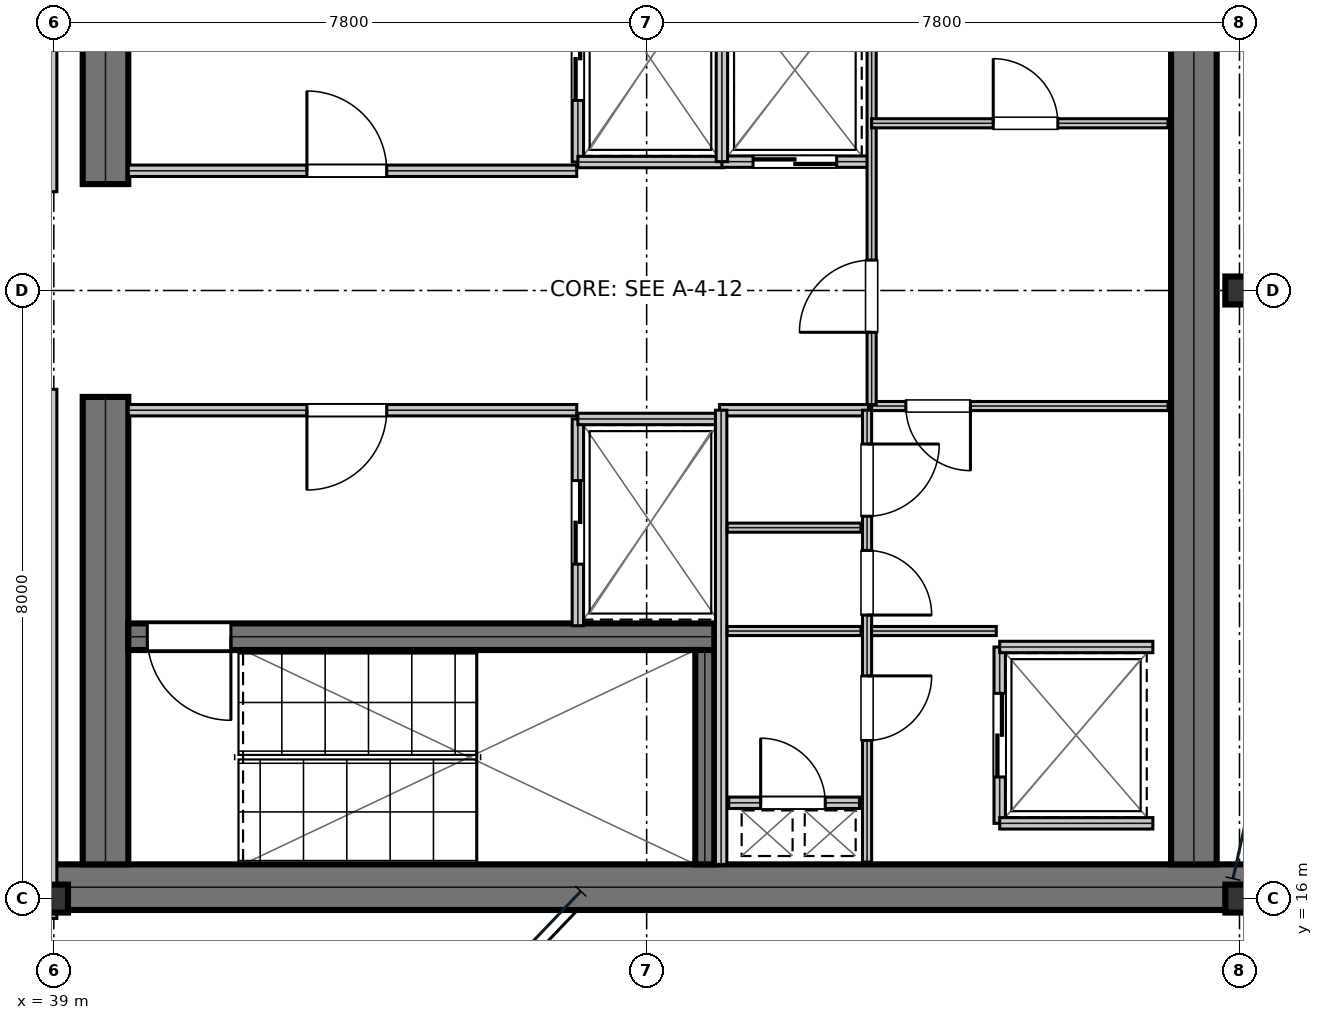
"""IFC4 building model, lengths in metres.
Left out: names, types, materials, properties, quantities, classifications, styles, units other than length and angle.
Written with IfcOpenShell. Run it as: python <this file> out.ifc"""

import sys

from ifc_helpers import new_model, si_unit, direction, frame, frame_2d, origin, origin_2d, place, context, subcontext, project, spatial, rectangle, i_section, extrude, element, fill, save


model = new_model("IFC4")
c1 = context("Model", 3, precision=1e-05, world=origin(), true_north=direction((0.0, 1.0)))
c2 = subcontext(c1, "Body", "Model", "MODEL_VIEW")
j1 = project(units=[si_unit("LENGTHUNIT", "METRE"), si_unit("PLANEANGLEUNIT", "RADIAN")], contexts=[c1])
p1 = place(None, origin())
s1 = spatial("IfcSite", under=j1, at=p1, CompositionType="ELEMENT")
p2 = place(p1, origin())
s2 = spatial("IfcBuilding", under=s1, at=p2, CompositionType="ELEMENT")
p3 = place(p2, frame((0.0, 0.0, 295.2)))
s3 = spatial("IfcBuildingStorey", under=s2, at=p3, CompositionType="ELEMENT", Elevation=295.2)
p4 = place(p3, frame((38.8, 16.15, 0.0), z_axis=(0.0, 0.0, 1.0), x_axis=(1.0, 0.0, 0.0)))
e1 = element("IfcWall", 1, at=p4, inside=s3, PredefinedType="SHEAR", context=c2, shape_type="SweptSolid", body=[
    extrude(rectangle(XDim=16.0, YDim=0.6, at=frame_2d((8.0, 0.0))), origin(), (0.0, 0.0, 1.0), 3.81),
])
for number, where, z_axis, x_axis in (
    (2, (39.68, 16.45, 0.0), (0.0, 0.0, 1.0), (0.0, 1.0, 0.0)),
    (3, (39.68, 25.4, 0.0), (0.0, 0.0, 1.0), (0.0, 1.0, 0.0)),
):
    element("IfcWall", number, at=place(p3, frame(where, z_axis=z_axis, x_axis=x_axis)), inside=s3, PredefinedType="SHEAR", context=c2, shape_type="SweptSolid", body=[
        extrude(rectangle(XDim=6.15, YDim=0.6, at=frame_2d((3.075, 0.0))), origin(), (0.0, 0.0, 1.0), 3.81),
    ])
p5 = place(p3, frame((54.0, 16.45, 0.0), z_axis=(0.0, 0.0, 1.0), x_axis=(0.0, 1.0, 0.0)))
e4 = element("IfcWall", 4, at=p5, inside=s3, PredefinedType="SHEAR", context=c2, shape_type="SweptSolid", body=[
    extrude(rectangle(XDim=15.1, YDim=0.6, at=frame_2d((7.55, 0.0))), origin(), (0.0, 0.0, 1.0), 3.81),
])
p6 = place(p3, frame((39.98, 19.445, 0.0), z_axis=(0.0, 0.0, 1.0), x_axis=(1.0, 0.0, 0.0)))
e5 = element("IfcWall", 5, at=p6, inside=s3, PredefinedType="SHEAR", context=c2, shape_type="SweptSolid", body=[
    extrude(rectangle(XDim=7.71, YDim=0.35, at=frame_2d((3.855, 0.0))), origin(), (0.0, 0.0, 1.0), 3.81),
])
p7 = place(p6, frame((0.25, 0.0, 0.0)))
e6 = element("IfcOpeningElement", 6, at=p7, cuts=e5, PredefinedType="OPENING", context=c2, shape_type="SweptSolid", body=[
    extrude(rectangle(XDim=1.1, YDim=2.15, at=frame_2d((0.55, 1.075))), frame((0.0, 0.185, 0.0), z_axis=(0.0, -1.0, 0.0), x_axis=(1.0, 0.0, 0.0)), (0.0, 0.0, 1.0), 0.37),
])
p8 = place(p3, frame((47.565, 16.45, 0.0), z_axis=(0.0, 0.0, 1.0), x_axis=(0.0, 1.0, 0.0)))
e7 = element("IfcWall", 7, at=p8, inside=s3, PredefinedType="SHEAR", context=c2, shape_type="SweptSolid", body=[
    extrude(rectangle(XDim=2.82, YDim=0.25, at=frame_2d((1.41, 0.0))), origin(), (0.0, 0.0, 1.0), 3.81),
])
for number, where, z_axis, x_axis in (
    (8, (39.0, 16.0, 0.0), (0.0, 0.0, 1.0), (1.0, 0.0, 0.0)),
    (9, (54.6, 16.0, 0.0), (0.0, 0.0, 1.0), (1.0, 0.0, 0.0)),
    (10, (54.6, 24.0, 0.0), (0.0, 0.0, 1.0), (1.0, 0.0, 0.0)),
):
    element("IfcColumn", number, at=place(p3, frame(where, z_axis=z_axis, x_axis=x_axis)), inside=s3, PredefinedType="COLUMN", context=c2, shape_type="SweptSolid", body=[
        extrude(i_section(OverallWidth=0.373, OverallDepth=0.368, WebThickness=0.015, FlangeThickness=0.024, at=origin_2d()), origin(), (0.0, 0.0, 1.0), 4.044),
    ])
p9 = place(p3, frame((39.98, 25.575, 0.0), z_axis=(0.0, 0.0, 1.0), x_axis=(1.0, 0.0, 0.0)))
e11 = element("IfcWall", 11, at=p9, inside=s3, PredefinedType="PARTITIONING", context=c2, shape_type="SweptSolid", body=[
    extrude(rectangle(XDim=5.9, YDim=0.15, at=frame_2d((2.95, 0.0))), origin(), (0.0, 0.0, 1.0), 3.81),
])
p10 = place(p9, frame((2.35, 0.0, 0.0)))
e12 = element("IfcOpeningElement", 12, at=p10, cuts=e11, PredefinedType="OPENING", context=c2, shape_type="SweptSolid", body=[
    extrude(rectangle(XDim=1.05, YDim=2.15, at=frame_2d((0.525, 1.075))), frame((0.0, 0.085, 0.0), z_axis=(0.0, -1.0, 0.0), x_axis=(1.0, 0.0, 0.0)), (0.0, 0.0, 1.0), 0.17),
])
p11 = place(p3, frame((39.98, 22.425, 0.0), z_axis=(0.0, 0.0, 1.0), x_axis=(1.0, 0.0, 0.0)))
e13 = element("IfcWall", 13, at=p11, inside=s3, PredefinedType="PARTITIONING", context=c2, shape_type="SweptSolid", body=[
    extrude(rectangle(XDim=5.9, YDim=0.15, at=frame_2d((2.95, 0.0))), origin(), (0.0, 0.0, 1.0), 3.81),
])
p12 = place(p11, frame((2.35, 0.0, 0.0)))
e14 = element("IfcOpeningElement", 14, at=p12, cuts=e13, PredefinedType="OPENING", context=c2, shape_type="SweptSolid", body=[
    extrude(rectangle(XDim=1.05, YDim=2.15, at=frame_2d((0.525, 1.075))), frame((0.0, 0.085, 0.0), z_axis=(0.0, -1.0, 0.0), x_axis=(1.0, 0.0, 0.0)), (0.0, 0.0, 1.0), 0.17),
])
p13 = place(p3, frame((45.895, 25.69, 0.0), z_axis=(0.0, 0.0, 1.0), x_axis=(0.0, 1.0, 0.0)))
e15 = element("IfcWall", 15, at=p13, inside=s3, PredefinedType="PARTITIONING", context=c2, shape_type="SweptSolid", body=[
    extrude(rectangle(XDim=2.72, YDim=0.15, at=frame_2d((1.36, 0.0))), origin(), (0.0, 0.0, 1.0), 3.81),
])
p14 = place(p13, frame((0.81, 0.0, 0.0)))
e16 = element("IfcOpeningElement", 16, at=p14, cuts=e15, PredefinedType="OPENING", context=c2, shape_type="SweptSolid", body=[
    extrude(rectangle(XDim=1.1, YDim=2.15, at=frame_2d((0.55, 1.075))), frame((0.0, 0.085, 0.0), z_axis=(0.0, -1.0, 0.0), x_axis=(1.0, 0.0, 0.0)), (0.0, 0.0, 1.0), 0.17),
])
p15 = place(p3, frame((45.895, 25.69, 0.0), z_axis=(0.0, 0.0, 1.0), x_axis=(1.0, 0.0, 0.0)))
e17 = element("IfcWall", 17, at=p15, inside=s3, PredefinedType="PARTITIONING", context=c2, shape_type="SweptSolid", body=[
    extrude(rectangle(XDim=1.915, YDim=0.15, at=frame_2d((0.958, 0.0))), origin(), (0.0, 0.0, 1.0), 3.81),
])
p16 = place(p3, frame((45.895, 19.59, 0.0), z_axis=(0.0, 0.0, 1.0), x_axis=(0.0, 1.0, 0.0)))
e18 = element("IfcWall", 18, at=p16, inside=s3, PredefinedType="PARTITIONING", context=c2, shape_type="SweptSolid", body=[
    extrude(rectangle(XDim=2.72, YDim=0.15, at=frame_2d((1.36, 0.0))), origin(), (0.0, 0.0, 1.0), 3.81),
])
p17 = place(p16, frame((0.81, 0.0, 0.0)))
e19 = element("IfcOpeningElement", 19, at=p17, cuts=e18, PredefinedType="OPENING", context=c2, shape_type="SweptSolid", body=[
    extrude(rectangle(XDim=1.1, YDim=2.15, at=frame_2d((0.55, 1.075))), frame((0.0, 0.085, 0.0), z_axis=(0.0, -1.0, 0.0), x_axis=(1.0, 0.0, 0.0)), (0.0, 0.0, 1.0), 0.17),
])
p18 = place(p3, frame((45.895, 22.31, 0.0), z_axis=(0.0, 0.0, 1.0), x_axis=(1.0, 0.0, 0.0)))
e20 = element("IfcWall", 20, at=p18, inside=s3, PredefinedType="PARTITIONING", context=c2, shape_type="SweptSolid", body=[
    extrude(rectangle(XDim=1.915, YDim=0.15, at=frame_2d((0.958, 0.0))), origin(), (0.0, 0.0, 1.0), 3.81),
])
p19 = place(p3, frame((47.79, 25.695, 0.0), z_axis=(0.0, 0.0, 1.0), x_axis=(1.0, 0.0, 0.0)))
e21 = element("IfcWall", 21, at=p19, inside=s3, PredefinedType="PARTITIONING", context=c2, shape_type="SweptSolid", body=[
    extrude(rectangle(XDim=1.92, YDim=0.15, at=frame_2d((0.96, 0.0))), origin(), (0.0, 0.0, 1.0), 3.81),
])
p20 = place(p19, frame((0.41, 0.0, 0.0)))
e22 = element("IfcOpeningElement", 22, at=p20, cuts=e21, PredefinedType="OPENING", context=c2, shape_type="SweptSolid", body=[
    extrude(rectangle(XDim=1.1, YDim=2.15, at=frame_2d((0.55, 1.075))), frame((0.0, 0.085, 0.0), z_axis=(0.0, -1.0, 0.0), x_axis=(1.0, 0.0, 0.0)), (0.0, 0.0, 1.0), 0.17),
])
p21 = place(p3, frame((47.79, 25.695, 0.0), z_axis=(0.0, 0.0, 1.0), x_axis=(0.0, 1.0, 0.0)))
e23 = element("IfcWall", 23, at=p21, inside=s3, PredefinedType="PARTITIONING", context=c2, shape_type="SweptSolid", body=[
    extrude(rectangle(XDim=2.415, YDim=0.15, at=frame_2d((1.208, 0.0))), origin(), (0.0, 0.0, 1.0), 3.81),
])
p22 = place(p3, frame((51.445, 16.99, 0.0), z_axis=(0.0, 0.0, 1.0), x_axis=(0.0, 1.0, 0.0)))
e24 = element("IfcWall", 24, at=p22, inside=s3, PredefinedType="PARTITIONING", context=c2, shape_type="SweptSolid", body=[
    extrude(rectangle(XDim=2.32, YDim=0.15, at=frame_2d((1.16, 0.0))), origin(), (0.0, 0.0, 1.0), 3.81),
])
p23 = place(p22, frame((0.61, 0.0, 0.0)))
e25 = element("IfcOpeningElement", 25, at=p23, cuts=e24, PredefinedType="OPENING", context=c2, shape_type="SweptSolid", body=[
    extrude(rectangle(XDim=1.1, YDim=2.15, at=frame_2d((0.55, 1.075))), frame((0.0, 0.085, 0.0), z_axis=(0.0, -1.0, 0.0), x_axis=(1.0, 0.0, 0.0)), (0.0, 0.0, 1.0), 0.17),
])
for number, where, z_axis, x_axis in (
    (26, (51.445, 16.99, 0.0), (0.0, 0.0, 1.0), (1.0, 0.0, 0.0)),
    (27, (51.445, 19.31, 0.0), (0.0, 0.0, 1.0), (1.0, 0.0, 0.0)),
):
    element("IfcWall", number, at=place(p3, frame(where, z_axis=z_axis, x_axis=x_axis)), inside=s3, PredefinedType="PARTITIONING", context=c2, shape_type="SweptSolid", body=[
        extrude(rectangle(XDim=2.015, YDim=0.15, at=frame_2d((1.007, 0.0))), origin(), (0.0, 0.0, 1.0), 3.81),
    ])
p24 = place(p3, frame((47.88, 17.26, 0.0), z_axis=(0.0, 0.0, 1.0), x_axis=(1.0, 0.0, 0.0)))
e28 = element("IfcWall", 28, at=p24, inside=s3, PredefinedType="PARTITIONING", context=c2, shape_type="SweptSolid", body=[
    extrude(rectangle(XDim=1.72, YDim=0.15, at=frame_2d((0.86, 0.0))), origin(), (0.0, 0.0, 1.0), 3.81),
])
p25 = place(p24, frame((0.42, 0.0, 0.0)))
e29 = element("IfcOpeningElement", 29, at=p25, cuts=e28, PredefinedType="OPENING", context=c2, shape_type="SweptSolid", body=[
    extrude(rectangle(XDim=0.85, YDim=2.15, at=frame_2d((0.425, 1.075))), frame((0.0, 0.085, 0.0), z_axis=(0.0, -1.0, 0.0), x_axis=(1.0, 0.0, 0.0)), (0.0, 0.0, 1.0), 0.17),
])
p26 = place(p3, frame((47.76, 22.425, 0.0), z_axis=(0.0, 0.0, 1.0), x_axis=(1.0, 0.0, 0.0)))
e30 = element("IfcWall", 30, at=p26, inside=s3, PredefinedType="PARTITIONING", context=c2, shape_type="SweptSolid", body=[
    extrude(rectangle(XDim=1.96, YDim=0.15, at=frame_2d((0.98, 0.0))), origin(), (0.0, 0.0, 1.0), 3.81),
])
p27 = place(p3, frame((47.78, 16.45, 0.0), z_axis=(0.0, 0.0, 1.0), x_axis=(0.0, 1.0, 0.0)))
e31 = element("IfcWall", 31, at=p27, inside=s3, PredefinedType="PARTITIONING", context=c2, shape_type="SweptSolid", body=[
    extrude(rectangle(XDim=5.975, YDim=0.15, at=frame_2d((2.988, 0.0))), origin(), (0.0, 0.0, 1.0), 3.81),
])
for number, where, z_axis, x_axis in (
    (32, (47.86, 19.52, 0.0), (0.0, 0.0, 1.0), (1.0, 0.0, 0.0)),
    (33, (47.86, 20.88, 0.0), (0.0, 0.0, 1.0), (1.0, 0.0, 0.0)),
):
    element("IfcWall", number, at=place(p3, frame(where, z_axis=z_axis, x_axis=x_axis)), inside=s3, PredefinedType="PARTITIONING", context=c2, shape_type="SweptSolid", body=[
        extrude(rectangle(XDim=1.76, YDim=0.12, at=frame_2d((0.88, 0.0))), origin(), (0.0, 0.0, 1.0), 3.81),
    ])
p28 = place(p3, frame((49.7, 16.48, 0.0), z_axis=(0.0, 0.0, 1.0), x_axis=(0.0, 1.0, 0.0)))
e34 = element("IfcWall", 34, at=p28, inside=s3, PredefinedType="PARTITIONING", context=c2, shape_type="SweptSolid", body=[
    extrude(rectangle(XDim=5.945, YDim=0.12, at=frame_2d((2.973, 0.0))), origin(), (0.0, 0.0, 1.0), 3.81),
])
p29 = place(p28, frame((1.6, 0.0, 0.0)))
e35 = element("IfcOpeningElement", 35, at=p29, cuts=e34, PredefinedType="OPENING", context=c2, shape_type="SweptSolid", body=[
    extrude(rectangle(XDim=0.85, YDim=2.15, at=frame_2d((0.425, 1.075))), frame((0.0, 0.07, 0.0), z_axis=(0.0, -1.0, 0.0), x_axis=(1.0, 0.0, 0.0)), (0.0, 0.0, 1.0), 0.14),
])
p30 = place(p28, frame((3.25, 0.0, 0.0)))
e36 = element("IfcOpeningElement", 36, at=p30, cuts=e34, PredefinedType="OPENING", context=c2, shape_type="SweptSolid", body=[
    extrude(rectangle(XDim=0.85, YDim=2.15, at=frame_2d((0.425, 1.075))), frame((0.0, 0.07, 0.0), z_axis=(0.0, -1.0, 0.0), x_axis=(1.0, 0.0, 0.0)), (0.0, 0.0, 1.0), 0.14),
])
p31 = place(p28, frame((4.55, 0.0, 0.0)))
e37 = element("IfcOpeningElement", 37, at=p31, cuts=e34, PredefinedType="OPENING", context=c2, shape_type="SweptSolid", body=[
    extrude(rectangle(XDim=0.95, YDim=2.15, at=frame_2d((0.475, 1.075))), frame((0.0, 0.07, 0.0), z_axis=(0.0, -1.0, 0.0), x_axis=(1.0, 0.0, 0.0)), (0.0, 0.0, 1.0), 0.14),
])
p32 = place(p3, frame((49.76, 22.48, 0.0), z_axis=(0.0, 0.0, 1.0), x_axis=(1.0, 0.0, 0.0)))
e38 = element("IfcWall", 38, at=p32, inside=s3, PredefinedType="PARTITIONING", context=c2, shape_type="SweptSolid", body=[
    extrude(rectangle(XDim=3.9, YDim=0.12, at=frame_2d((1.95, 0.0))), origin(), (0.0, 0.0, 1.0), 3.81),
])
p33 = place(p32, frame((0.45, 0.0, 0.0)))
e39 = element("IfcOpeningElement", 39, at=p33, cuts=e38, PredefinedType="OPENING", context=c2, shape_type="SweptSolid", body=[
    extrude(rectangle(XDim=0.85, YDim=2.15, at=frame_2d((0.425, 1.075))), frame((0.0, 0.07, 0.0), z_axis=(0.0, -1.0, 0.0), x_axis=(1.0, 0.0, 0.0)), (0.0, 0.0, 1.0), 0.14),
])
p34 = place(p3, frame((49.76, 19.52, 0.0), z_axis=(0.0, 0.0, 1.0), x_axis=(1.0, 0.0, 0.0)))
e40 = element("IfcWall", 40, at=p34, inside=s3, PredefinedType="PARTITIONING", context=c2, shape_type="SweptSolid", body=[
    extrude(rectangle(XDim=1.64, YDim=0.12, at=frame_2d((0.82, 0.0))), origin(), (0.0, 0.0, 1.0), 3.81),
])
p35 = place(p3, frame((49.76, 22.5, 0.0), z_axis=(0.0, 0.0, 1.0), x_axis=(0.0, 1.0, 0.0)))
e41 = element("IfcWall", 41, at=p35, inside=s3, PredefinedType="PARTITIONING", context=c2, shape_type="SweptSolid", body=[
    extrude(rectangle(XDim=5.72, YDim=0.12, at=frame_2d((2.86, 0.0))), origin(), (0.0, 0.0, 1.0), 3.81),
])
p36 = place(p35, frame((0.95, 0.0, 0.0)))
e42 = element("IfcOpeningElement", 42, at=p36, cuts=e41, PredefinedType="OPENING", context=c2, shape_type="SweptSolid", body=[
    extrude(rectangle(XDim=0.95, YDim=2.15, at=frame_2d((0.475, 1.075))), frame((0.0, 0.07, 0.0), z_axis=(0.0, -1.0, 0.0), x_axis=(1.0, 0.0, 0.0)), (0.0, 0.0, 1.0), 0.14),
])
p37 = place(p3, frame((49.76, 26.2, 0.0), z_axis=(0.0, 0.0, 1.0), x_axis=(1.0, 0.0, 0.0)))
e43 = element("IfcWall", 43, at=p37, inside=s3, PredefinedType="PARTITIONING", context=c2, shape_type="SweptSolid", body=[
    extrude(rectangle(XDim=3.9, YDim=0.12, at=frame_2d((1.95, 0.0))), origin(), (0.0, 0.0, 1.0), 3.81),
])
p38 = place(p37, frame((1.6, 0.0, 0.0)))
e44 = element("IfcOpeningElement", 44, at=p38, cuts=e43, PredefinedType="OPENING", context=c2, shape_type="SweptSolid", body=[
    extrude(rectangle(XDim=0.85, YDim=2.15, at=frame_2d((0.425, 1.075))), frame((0.0, 0.07, 0.0), z_axis=(0.0, -1.0, 0.0), x_axis=(1.0, 0.0, 0.0)), (0.0, 0.0, 1.0), 0.14),
])
for number, where, z_axis, x_axis in (
    (45, (38.95, 15.739, 0.0), (0.0, 0.0, 1.0), (0.0, 1.0, 0.0)),
    (46, (38.95, 25.3, 0.0), (0.0, 0.0, 1.0), (0.0, 1.0, 0.0)),
):
    element("IfcWall", number, at=place(p3, frame(where, z_axis=z_axis, x_axis=x_axis)), inside=s3, PredefinedType="SOLIDWALL", context=c2, shape_type="SweptSolid", body=[
        extrude(rectangle(XDim=6.961, YDim=0.18, at=frame_2d((3.48, 0.0))), origin(), (0.0, 0.0, 1.0), 3.27),
    ])
p39 = place(p10, origin())
e47 = element("IfcDoor", 47, at=p39, inside=s3, OperationType="SINGLE_SWING_LEFT", PredefinedType="DOOR", context=c2, shape_type="SweptSolid", body=[
    extrude(rectangle(XDim=1.05, YDim=2.15, at=frame_2d((0.525, 1.075))), frame((0.0, 0.025, 0.0), z_axis=(0.0, -1.0, 0.0), x_axis=(1.0, 0.0, 0.0)), (0.0, 0.0, 1.0), 0.05),
])
fill(e12, e47)
p40 = place(p12, frame((1.05, 0.0, 0.0), z_axis=(0.0, 0.0, 1.0), x_axis=(-1.0, 0.0, 0.0)))
e48 = element("IfcDoor", 48, at=p40, inside=s3, OperationType="SINGLE_SWING_RIGHT", PredefinedType="DOOR", context=c2, shape_type="SweptSolid", body=[
    extrude(rectangle(XDim=1.05, YDim=2.15, at=frame_2d((0.525, 1.075))), frame((0.0, 0.025, 0.0), z_axis=(0.0, -1.0, 0.0), x_axis=(1.0, 0.0, 0.0)), (0.0, 0.0, 1.0), 0.05),
])
fill(e14, e48)
p41 = place(p14, frame((1.1, 0.0, 0.0), z_axis=(0.0, 0.0, 1.0), x_axis=(-1.0, 0.0, 0.0)))
e49 = element("IfcDoor", 49, at=p41, inside=s3, OperationType="DOUBLE_DOOR_SLIDING", PredefinedType="DOOR", context=c2, shape_type="SweptSolid", body=[
    extrude(rectangle(XDim=1.1, YDim=2.15, at=frame_2d((0.55, 1.075))), frame((0.0, 0.025, 0.0), z_axis=(0.0, -1.0, 0.0), x_axis=(1.0, 0.0, 0.0)), (0.0, 0.0, 1.0), 0.05),
])
fill(e16, e49)
p42 = place(p17, frame((1.1, 0.0, 0.0), z_axis=(0.0, 0.0, 1.0), x_axis=(-1.0, 0.0, 0.0)))
e50 = element("IfcDoor", 50, at=p42, inside=s3, OperationType="DOUBLE_DOOR_SLIDING", PredefinedType="DOOR", context=c2, shape_type="SweptSolid", body=[
    extrude(rectangle(XDim=1.1, YDim=2.15, at=frame_2d((0.55, 1.075))), frame((0.0, 0.025, 0.0), z_axis=(0.0, -1.0, 0.0), x_axis=(1.0, 0.0, 0.0)), (0.0, 0.0, 1.0), 0.05),
])
fill(e19, e50)
p43 = place(p20, frame((1.1, 0.0, 0.0), z_axis=(0.0, 0.0, 1.0), x_axis=(-1.0, 0.0, 0.0)))
e51 = element("IfcDoor", 51, at=p43, inside=s3, OperationType="DOUBLE_DOOR_SLIDING", PredefinedType="DOOR", context=c2, shape_type="SweptSolid", body=[
    extrude(rectangle(XDim=1.1, YDim=2.15, at=frame_2d((0.55, 1.075))), frame((0.0, 0.025, 0.0), z_axis=(0.0, -1.0, 0.0), x_axis=(1.0, 0.0, 0.0)), (0.0, 0.0, 1.0), 0.05),
])
fill(e22, e51)
p44 = place(p23, frame((1.1, 0.0, 0.0), z_axis=(0.0, 0.0, 1.0), x_axis=(-1.0, 0.0, 0.0)))
e52 = element("IfcDoor", 52, at=p44, inside=s3, OperationType="DOUBLE_DOOR_SLIDING", PredefinedType="DOOR", context=c2, shape_type="SweptSolid", body=[
    extrude(rectangle(XDim=1.1, YDim=2.15, at=frame_2d((0.55, 1.075))), frame((0.0, 0.025, 0.0), z_axis=(0.0, -1.0, 0.0), x_axis=(1.0, 0.0, 0.0)), (0.0, 0.0, 1.0), 0.05),
])
fill(e25, e52)
p45 = place(p25, origin())
e53 = element("IfcDoor", 53, at=p45, inside=s3, OperationType="SINGLE_SWING_LEFT", PredefinedType="TRAPDOOR", context=c2, shape_type="SweptSolid", body=[
    extrude(rectangle(XDim=0.85, YDim=2.15, at=frame_2d((0.425, 1.075))), frame((0.0, 0.025, 0.0), z_axis=(0.0, -1.0, 0.0), x_axis=(1.0, 0.0, 0.0)), (0.0, 0.0, 1.0), 0.05),
])
fill(e29, e53)
p46 = place(p29, frame((0.85, 0.0, 0.0), z_axis=(0.0, 0.0, 1.0), x_axis=(-1.0, 0.0, 0.0)))
e54 = element("IfcDoor", 54, at=p46, inside=s3, OperationType="SINGLE_SWING_LEFT", PredefinedType="DOOR", context=c2, shape_type="SweptSolid", body=[
    extrude(rectangle(XDim=0.85, YDim=2.15, at=frame_2d((0.425, 1.075))), frame((0.0, 0.025, 0.0), z_axis=(0.0, -1.0, 0.0), x_axis=(1.0, 0.0, 0.0)), (0.0, 0.0, 1.0), 0.05),
])
fill(e35, e54)
p47 = place(p30, frame((0.85, 0.0, 0.0), z_axis=(0.0, 0.0, 1.0), x_axis=(-1.0, 0.0, 0.0)))
e55 = element("IfcDoor", 55, at=p47, inside=s3, OperationType="SINGLE_SWING_RIGHT", PredefinedType="DOOR", context=c2, shape_type="SweptSolid", body=[
    extrude(rectangle(XDim=0.85, YDim=2.15, at=frame_2d((0.425, 1.075))), frame((0.0, 0.025, 0.0), z_axis=(0.0, -1.0, 0.0), x_axis=(1.0, 0.0, 0.0)), (0.0, 0.0, 1.0), 0.05),
])
fill(e36, e55)
p48 = place(p31, frame((0.95, 0.0, 0.0), z_axis=(0.0, 0.0, 1.0), x_axis=(-1.0, 0.0, 0.0)))
e56 = element("IfcDoor", 56, at=p48, inside=s3, OperationType="SINGLE_SWING_LEFT", PredefinedType="DOOR", context=c2, shape_type="SweptSolid", body=[
    extrude(rectangle(XDim=0.95, YDim=2.15, at=frame_2d((0.475, 1.075))), frame((0.0, 0.025, 0.0), z_axis=(0.0, -1.0, 0.0), x_axis=(1.0, 0.0, 0.0)), (0.0, 0.0, 1.0), 0.05),
])
fill(e37, e56)
p49 = place(p33, frame((0.85, 0.0, 0.0), z_axis=(0.0, 0.0, 1.0), x_axis=(-1.0, 0.0, 0.0)))
e57 = element("IfcDoor", 57, at=p49, inside=s3, OperationType="SINGLE_SWING_LEFT", PredefinedType="DOOR", context=c2, shape_type="SweptSolid", body=[
    extrude(rectangle(XDim=0.85, YDim=2.15, at=frame_2d((0.425, 1.075))), frame((0.0, 0.025, 0.0), z_axis=(0.0, -1.0, 0.0), x_axis=(1.0, 0.0, 0.0)), (0.0, 0.0, 1.0), 0.05),
])
fill(e39, e57)
p50 = place(p36, origin())
e58 = element("IfcDoor", 58, at=p50, inside=s3, OperationType="SINGLE_SWING_LEFT", PredefinedType="DOOR", context=c2, shape_type="SweptSolid", body=[
    extrude(rectangle(XDim=0.95, YDim=2.15, at=frame_2d((0.475, 1.075))), frame((0.0, 0.025, 0.0), z_axis=(0.0, -1.0, 0.0), x_axis=(1.0, 0.0, 0.0)), (0.0, 0.0, 1.0), 0.05),
])
fill(e42, e58)
p51 = place(p38, origin())
e59 = element("IfcDoor", 59, at=p51, inside=s3, OperationType="SINGLE_SWING_LEFT", PredefinedType="DOOR", context=c2, shape_type="SweptSolid", body=[
    extrude(rectangle(XDim=0.85, YDim=2.15, at=frame_2d((0.425, 1.075))), frame((0.0, 0.025, 0.0), z_axis=(0.0, -1.0, 0.0), x_axis=(1.0, 0.0, 0.0)), (0.0, 0.0, 1.0), 0.05),
])
fill(e44, e59)
p52 = place(p7, frame((1.1, 0.0, 0.0), z_axis=(0.0, 0.0, 1.0), x_axis=(-1.0, 0.0, 0.0)))
e60 = element("IfcDoor", 60, at=p52, inside=s3, OperationType="SINGLE_SWING_LEFT", PredefinedType="DOOR", context=c2, shape_type="SweptSolid", body=[
    extrude(rectangle(XDim=1.1, YDim=2.15, at=frame_2d((0.55, 1.075))), frame((0.0, 0.025, 0.0), z_axis=(0.0, -1.0, 0.0), x_axis=(1.0, 0.0, 0.0)), (0.0, 0.0, 1.0), 0.05),
])
fill(e6, e60)
save(model, sys.argv[1])
